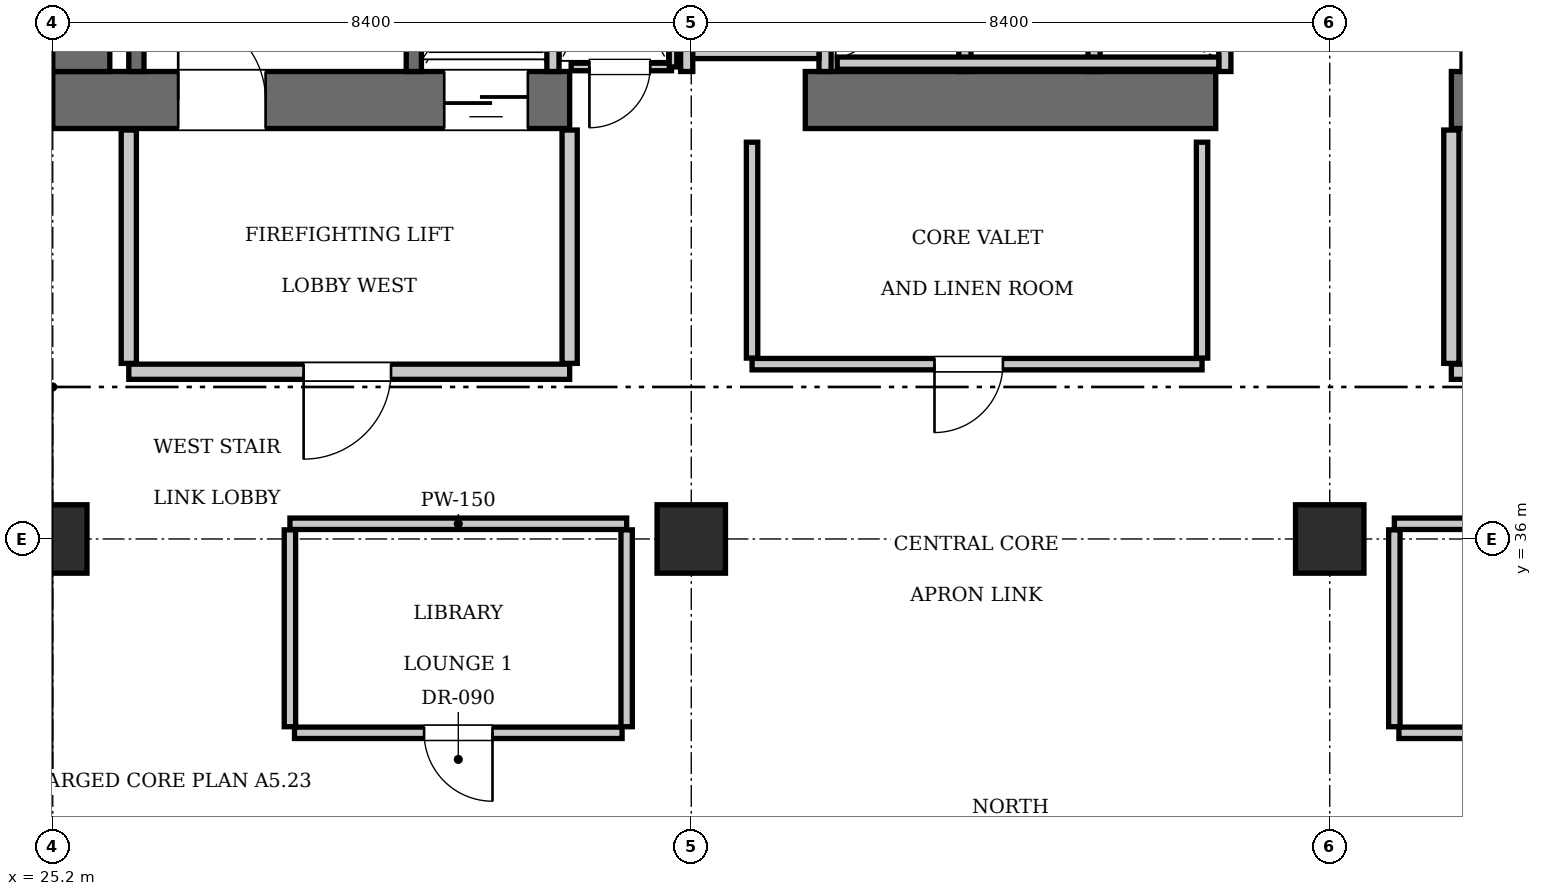
"""IFC4 building model, lengths in metres.
Left out: names, types, materials, properties, quantities, classifications, styles, units other than length and angle.
Written with IfcOpenShell. Run it as: python <this file> out.ifc"""

import sys

from ifc_helpers import new_model, si_unit, direction, frame, frame_2d, origin, origin_2d, place, context, subcontext, project, spatial, rectangle, extrude, element, fill, save


model = new_model("IFC4")
c1 = context("Model", 3, precision=1e-05, world=origin(), true_north=direction((0.0, 1.0)))
c2 = subcontext(c1, "Body", "Model", "MODEL_VIEW")
j1 = project(units=[si_unit("LENGTHUNIT", "METRE"), si_unit("PLANEANGLEUNIT", "RADIAN")], contexts=[c1])
p1 = place(None, origin())
s1 = spatial("IfcSite", under=j1, at=p1, CompositionType="ELEMENT")
p2 = place(p1, origin())
s2 = spatial("IfcBuilding", under=s1, at=p2, CompositionType="ELEMENT")
p3 = place(p2, frame((0.0, 0.0, 185.15)))
s3 = spatial("IfcBuildingStorey", under=s2, at=p3, CompositionType="ELEMENT", Elevation=185.15)
p4 = place(p3, frame((25.2, 41.775, 0.0), z_axis=(0.0, 0.0, 1.0), x_axis=(1.0, 0.0, 0.0)))
e1 = element("IfcWall", 1, at=p4, inside=s3, PredefinedType="SHEAR", context=c2, shape_type="SweptSolid", body=[
    extrude(rectangle(XDim=6.8, YDim=0.75, at=frame_2d((3.4, 0.0))), origin(), (0.0, 0.0, 1.0), 3.85),
])
p5 = place(p4, frame((1.65, 0.0, 0.0)))
e2 = element("IfcOpeningElement", 2, at=p5, cuts=e1, PredefinedType="OPENING", context=c2, shape_type="SweptSolid", body=[
    extrude(rectangle(XDim=1.15, YDim=2.15, at=frame_2d((0.575, 1.075))), frame((0.0, 0.385, 0.0), z_axis=(0.0, -1.0, 0.0), x_axis=(1.0, 0.0, 0.0)), (0.0, 0.0, 1.0), 0.77),
])
p6 = place(p4, frame((5.15, 0.0, 0.0)))
e3 = element("IfcOpeningElement", 3, at=p6, cuts=e1, PredefinedType="OPENING", context=c2, shape_type="SweptSolid", body=[
    extrude(rectangle(XDim=1.1, YDim=2.2, at=frame_2d((0.55, 1.1))), frame((0.0, 0.385, 0.0), z_axis=(0.0, -1.0, 0.0), x_axis=(1.0, 0.0, 0.0)), (0.0, 0.0, 1.0), 0.77),
])
p7 = place(p3, frame((35.1, 41.775, 0.0), z_axis=(0.0, 0.0, 1.0), x_axis=(1.0, 0.0, 0.0)))
e4 = element("IfcWall", 4, at=p7, inside=s3, PredefinedType="SHEAR", context=c2, shape_type="SweptSolid", body=[
    extrude(rectangle(XDim=5.4, YDim=0.75, at=frame_2d((2.7, 0.0))), origin(), (0.0, 0.0, 1.0), 3.85),
])
p8 = place(p3, frame((43.6, 41.775, 0.0), z_axis=(0.0, 0.0, 1.0), x_axis=(1.0, 0.0, 0.0)))
e5 = element("IfcWall", 5, at=p8, inside=s3, PredefinedType="SHEAR", context=c2, shape_type="SweptSolid", body=[
    extrude(rectangle(XDim=6.8, YDim=0.75, at=frame_2d((3.4, 0.0))), origin(), (0.0, 0.0, 1.0), 3.85),
])
p9 = place(p8, frame((3.9, 0.0, 0.0)))
e6 = element("IfcOpeningElement", 6, at=p9, cuts=e5, PredefinedType="OPENING", context=c2, shape_type="SweptSolid", body=[
    extrude(rectangle(XDim=1.15, YDim=2.15, at=frame_2d((0.575, 1.075))), frame((0.0, 0.385, 0.0), z_axis=(0.0, -1.0, 0.0), x_axis=(1.0, 0.0, 0.0)), (0.0, 0.0, 1.0), 0.77),
])
p10 = place(p8, frame((0.55, 0.0, 0.0)))
e7 = element("IfcOpeningElement", 7, at=p10, cuts=e5, PredefinedType="OPENING", context=c2, shape_type="SweptSolid", body=[
    extrude(rectangle(XDim=1.1, YDim=2.2, at=frame_2d((0.55, 1.1))), frame((0.0, 0.385, 0.0), z_axis=(0.0, -1.0, 0.0), x_axis=(1.0, 0.0, 0.0)), (0.0, 0.0, 1.0), 0.77),
])
p11 = place(p3, frame((25.575, 42.15, 0.0), z_axis=(0.0, 0.0, 1.0), x_axis=(0.0, 1.0, 0.0)))
e8 = element("IfcWall", 8, at=p11, inside=s3, PredefinedType="SHEAR", context=c2, shape_type="SweptSolid", body=[
    extrude(rectangle(XDim=1.9, YDim=0.75, at=frame_2d((0.95, 0.0))), origin(), (0.0, 0.0, 1.0), 3.85),
])
for number, where, z_axis, x_axis in (
    (9, (25.2, 36.0, 0.0), (0.0, 0.0, 1.0), (1.0, 0.0, 0.0)),
    (10, (33.6, 36.0, 0.0), (0.0, 0.0, 1.0), (1.0, 0.0, 0.0)),
    (11, (42.0, 36.0, 0.0), (0.0, 0.0, 1.0), (1.0, 0.0, 0.0)),
):
    element("IfcColumn", number, at=place(p3, frame(where, z_axis=z_axis, x_axis=x_axis)), inside=s3, PredefinedType="COLUMN", context=c2, shape_type="SweptSolid", body=[
        extrude(rectangle(XDim=0.9, YDim=0.9, at=origin_2d()), origin(), (0.0, 0.0, 1.0), 3.85),
    ])
p12 = place(p3, frame((29.95, 42.15, 0.0), z_axis=(0.0, 0.0, 1.0), x_axis=(0.0, 1.0, 0.0)))
e12 = element("IfcWall", 12, at=p12, inside=s3, PredefinedType="SOLIDWALL", context=c2, shape_type="SweptSolid", body=[
    extrude(rectangle(XDim=9.0, YDim=0.2, at=frame_2d((4.5, 0.0))), origin(), (0.0, 0.0, 1.0), 3.61),
])
p13 = place(p3, frame((26.3, 42.15, 0.0), z_axis=(0.0, 0.0, 1.0), x_axis=(0.0, 1.0, 0.0)))
e13 = element("IfcWall", 13, at=p13, inside=s3, PredefinedType="SOLIDWALL", context=c2, shape_type="SweptSolid", body=[
    extrude(rectangle(XDim=1.87, YDim=0.2, at=frame_2d((0.935, 0.0))), origin(), (0.0, 0.0, 1.0), 3.61),
])
for number, where, z_axis, x_axis in (
    (14, (31.78, 42.15, 0.0), (0.0, 0.0, 1.0), (0.0, 1.0, 0.0)),
    (15, (43.82, 42.15, 0.0), (0.0, 0.0, 1.0), (0.0, 1.0, 0.0)),
):
    element("IfcWall", number, at=place(p3, frame(where, z_axis=z_axis, x_axis=x_axis)), inside=s3, PredefinedType="SOLIDWALL", context=c2, shape_type="SweptSolid", body=[
        extrude(rectangle(XDim=2.59, YDim=0.16, at=frame_2d((1.295, 0.0))), origin(), (0.0, 0.0, 1.0), 3.61),
    ])
for number, where, z_axis, x_axis in (
    (16, (37.2, 42.15, 0.0), (0.0, 0.0, 1.0), (0.0, 1.0, 0.0)),
    (17, (38.9, 42.15, 0.0), (0.0, 0.0, 1.0), (0.0, 1.0, 0.0)),
    (18, (40.62, 42.15, 0.0), (0.0, 0.0, 1.0), (0.0, 1.0, 0.0)),
):
    element("IfcWall", number, at=place(p3, frame(where, z_axis=z_axis, x_axis=x_axis)), inside=s3, PredefinedType="SOLIDWALL", context=c2, shape_type="SweptSolid", body=[
        extrude(rectangle(XDim=2.2, YDim=0.16, at=frame_2d((1.1, 0.0))), origin(), (0.0, 0.0, 1.0), 3.61),
    ])
p14 = place(p3, frame((35.52, 42.26, 0.0), z_axis=(0.0, 0.0, 1.0), x_axis=(1.0, 0.0, 0.0)))
e19 = element("IfcWall", 19, at=p14, inside=s3, PredefinedType="SOLIDWALL", context=c2, shape_type="SweptSolid", body=[
    extrude(rectangle(XDim=5.02, YDim=0.16, at=frame_2d((2.51, 0.0))), origin(), (0.0, 0.0, 1.0), 3.61),
])
for number, where, z_axis, x_axis in (
    (20, (33.54, 42.15, 0.0), (0.0, 0.0, 1.0), (0.0, 1.0, 0.0)),
    (21, (35.36, 42.15, 0.0), (0.0, 0.0, 1.0), (0.0, 1.0, 0.0)),
):
    element("IfcWall", number, at=place(p3, frame(where, z_axis=z_axis, x_axis=x_axis)), inside=s3, PredefinedType="SOLIDWALL", context=c2, shape_type="SweptSolid", body=[
        extrude(rectangle(XDim=2.25, YDim=0.16, at=frame_2d((1.125, 0.0))), origin(), (0.0, 0.0, 1.0), 3.61),
    ])
p15 = place(p3, frame((33.62, 42.4, 0.0), z_axis=(0.0, 0.0, 1.0), x_axis=(1.0, 0.0, 0.0)))
e22 = element("IfcWall", 22, at=p15, inside=s3, PredefinedType="SOLIDWALL", context=c2, shape_type="SweptSolid", body=[
    extrude(rectangle(XDim=1.66, YDim=0.16, at=frame_2d((0.83, 0.0))), origin(), (0.0, 0.0, 1.0), 3.61),
])
p16 = place(p3, frame((26.2, 38.2, 0.0), z_axis=(0.0, 0.0, 1.0), x_axis=(1.0, 0.0, 0.0)))
e23 = element("IfcWall", 23, at=p16, inside=s3, PredefinedType="PARTITIONING", context=c2, shape_type="SweptSolid", body=[
    extrude(rectangle(XDim=5.8, YDim=0.2, at=frame_2d((2.9, 0.0))), origin(), (0.0, 0.0, 1.0), 3.61),
])
p17 = place(p16, frame((2.3, 0.0, 0.0)))
e24 = element("IfcOpeningElement", 24, at=p17, cuts=e23, PredefinedType="OPENING", context=c2, shape_type="SweptSolid", body=[
    extrude(rectangle(XDim=1.15, YDim=2.15, at=frame_2d((0.575, 1.075))), frame((0.0, 0.11, 0.0), z_axis=(0.0, -1.0, 0.0), x_axis=(1.0, 0.0, 0.0)), (0.0, 0.0, 1.0), 0.22),
])
for number, where, z_axis, x_axis in (
    (25, (26.2, 38.31, 0.0), (0.0, 0.0, 1.0), (0.0, 1.0, 0.0)),
    (26, (32.0, 38.31, 0.0), (0.0, 0.0, 1.0), (0.0, 1.0, 0.0)),
):
    element("IfcWall", number, at=place(p3, frame(where, z_axis=z_axis, x_axis=x_axis)), inside=s3, PredefinedType="PARTITIONING", context=c2, shape_type="SweptSolid", body=[
        extrude(rectangle(XDim=3.07, YDim=0.2, at=frame_2d((1.535, 0.0))), origin(), (0.0, 0.0, 1.0), 3.61),
    ])
p18 = place(p3, frame((43.6, 38.2, 0.0), z_axis=(0.0, 0.0, 1.0), x_axis=(1.0, 0.0, 0.0)))
e27 = element("IfcWall", 27, at=p18, inside=s3, PredefinedType="PARTITIONING", context=c2, shape_type="SweptSolid", body=[
    extrude(rectangle(XDim=5.8, YDim=0.2, at=frame_2d((2.9, 0.0))), origin(), (0.0, 0.0, 1.0), 3.61),
])
p19 = place(p18, frame((2.3, 0.0, 0.0)))
e28 = element("IfcOpeningElement", 28, at=p19, cuts=e27, PredefinedType="OPENING", context=c2, shape_type="SweptSolid", body=[
    extrude(rectangle(XDim=1.15, YDim=2.15, at=frame_2d((0.575, 1.075))), frame((0.0, 0.11, 0.0), z_axis=(0.0, -1.0, 0.0), x_axis=(1.0, 0.0, 0.0)), (0.0, 0.0, 1.0), 0.22),
])
p20 = place(p3, frame((43.6, 38.31, 0.0), z_axis=(0.0, 0.0, 1.0), x_axis=(0.0, 1.0, 0.0)))
e29 = element("IfcWall", 29, at=p20, inside=s3, PredefinedType="PARTITIONING", context=c2, shape_type="SweptSolid", body=[
    extrude(rectangle(XDim=3.07, YDim=0.2, at=frame_2d((1.535, 0.0))), origin(), (0.0, 0.0, 1.0), 3.61),
])
p21 = place(p3, frame((32.02, 42.21, 0.0), z_axis=(0.0, 0.0, 1.0), x_axis=(1.0, 0.0, 0.0)))
e30 = element("IfcWall", 30, at=p21, inside=s3, PredefinedType="PARTITIONING", context=c2, shape_type="SweptSolid", body=[
    extrude(rectangle(XDim=1.32, YDim=0.1, at=frame_2d((0.66, 0.0))), origin(), (0.0, 0.0, 1.0), 3.61),
])
p22 = place(p21, frame((0.24, 0.0, 0.0)))
e31 = element("IfcOpeningElement", 31, at=p22, cuts=e30, PredefinedType="OPENING", context=c2, shape_type="SweptSolid", body=[
    extrude(rectangle(XDim=0.8, YDim=2.05, at=frame_2d((0.4, 1.025))), frame((0.0, 0.06, 0.0), z_axis=(0.0, -1.0, 0.0), x_axis=(1.0, 0.0, 0.0)), (0.0, 0.0, 1.0), 0.12),
])
p23 = place(p3, frame((33.36, 42.21, 0.0), z_axis=(0.0, 0.0, 1.0), x_axis=(0.0, 1.0, 0.0)))
e32 = element("IfcWall", 32, at=p23, inside=s3, PredefinedType="PARTITIONING", context=c2, shape_type="SweptSolid", body=[
    extrude(rectangle(XDim=2.73, YDim=0.1, at=frame_2d((1.365, 0.0))), origin(), (0.0, 0.0, 1.0), 3.61),
])
p24 = place(p3, frame((34.4, 38.3, 0.0), z_axis=(0.0, 0.0, 1.0), x_axis=(1.0, 0.0, 0.0)))
e33 = element("IfcWall", 33, at=p24, inside=s3, PredefinedType="PARTITIONING", context=c2, shape_type="SweptSolid", body=[
    extrude(rectangle(XDim=5.92, YDim=0.15, at=frame_2d((2.96, 0.0))), origin(), (0.0, 0.0, 1.0), 3.61),
])
p25 = place(p24, frame((2.4, 0.0, 0.0)))
e34 = element("IfcOpeningElement", 34, at=p25, cuts=e33, PredefinedType="OPENING", context=c2, shape_type="SweptSolid", body=[
    extrude(rectangle(XDim=0.9, YDim=2.1, at=frame_2d((0.45, 1.05))), frame((0.0, 0.085, 0.0), z_axis=(0.0, -1.0, 0.0), x_axis=(1.0, 0.0, 0.0)), (0.0, 0.0, 1.0), 0.17),
])
for number, where, z_axis, x_axis in (
    (35, (34.4, 38.38, 0.0), (0.0, 0.0, 1.0), (0.0, 1.0, 0.0)),
    (36, (40.32, 38.38, 0.0), (0.0, 0.0, 1.0), (0.0, 1.0, 0.0)),
):
    element("IfcWall", number, at=place(p3, frame(where, z_axis=z_axis, x_axis=x_axis)), inside=s3, PredefinedType="PARTITIONING", context=c2, shape_type="SweptSolid", body=[
        extrude(rectangle(XDim=2.84, YDim=0.15, at=frame_2d((1.42, 0.0))), origin(), (0.0, 0.0, 1.0), 3.61),
    ])
p26 = place(p3, frame((28.32, 36.2, 0.0), z_axis=(0.0, 0.0, 1.0), x_axis=(1.0, 0.0, 0.0)))
e37 = element("IfcWall", 37, at=p26, inside=s3, PredefinedType="PARTITIONING", context=c2, shape_type="SweptSolid", body=[
    extrude(rectangle(XDim=4.43, YDim=0.15, at=frame_2d((2.215, 0.0))), origin(), (0.0, 0.0, 1.0), 3.61),
])
for number, where, z_axis, x_axis in (
    (38, (28.32, 33.53, 0.0), (0.0, 0.0, 1.0), (0.0, 1.0, 0.0)),
    (39, (32.75, 33.53, 0.0), (0.0, 0.0, 1.0), (0.0, 1.0, 0.0)),
):
    element("IfcWall", number, at=place(p3, frame(where, z_axis=z_axis, x_axis=x_axis)), inside=s3, PredefinedType="PARTITIONING", context=c2, shape_type="SweptSolid", body=[
        extrude(rectangle(XDim=2.59, YDim=0.15, at=frame_2d((1.295, 0.0))), origin(), (0.0, 0.0, 1.0), 3.61),
    ])
p27 = place(p3, frame((28.38, 33.45, 0.0), z_axis=(0.0, 0.0, 1.0), x_axis=(1.0, 0.0, 0.0)))
e40 = element("IfcWall", 40, at=p27, inside=s3, PredefinedType="PARTITIONING", context=c2, shape_type="SweptSolid", body=[
    extrude(rectangle(XDim=4.31, YDim=0.15, at=frame_2d((2.155, 0.0))), origin(), (0.0, 0.0, 1.0), 3.61),
])
p28 = place(p27, frame((1.705, 0.0, 0.0)))
e41 = element("IfcOpeningElement", 41, at=p28, cuts=e40, PredefinedType="OPENING", context=c2, shape_type="SweptSolid", body=[
    extrude(rectangle(XDim=0.9, YDim=2.1, at=frame_2d((0.45, 1.05))), frame((0.0, 0.085, 0.0), z_axis=(0.0, -1.0, 0.0), x_axis=(1.0, 0.0, 0.0)), (0.0, 0.0, 1.0), 0.17),
])
p29 = place(p3, frame((42.85, 36.2, 0.0), z_axis=(0.0, 0.0, 1.0), x_axis=(1.0, 0.0, 0.0)))
e42 = element("IfcWall", 42, at=p29, inside=s3, PredefinedType="PARTITIONING", context=c2, shape_type="SweptSolid", body=[
    extrude(rectangle(XDim=4.43, YDim=0.15, at=frame_2d((2.215, 0.0))), origin(), (0.0, 0.0, 1.0), 3.61),
])
p30 = place(p3, frame((42.85, 33.53, 0.0), z_axis=(0.0, 0.0, 1.0), x_axis=(0.0, 1.0, 0.0)))
e43 = element("IfcWall", 43, at=p30, inside=s3, PredefinedType="PARTITIONING", context=c2, shape_type="SweptSolid", body=[
    extrude(rectangle(XDim=2.59, YDim=0.15, at=frame_2d((1.295, 0.0))), origin(), (0.0, 0.0, 1.0), 3.61),
])
p31 = place(p3, frame((42.91, 33.45, 0.0), z_axis=(0.0, 0.0, 1.0), x_axis=(1.0, 0.0, 0.0)))
e44 = element("IfcWall", 44, at=p31, inside=s3, PredefinedType="PARTITIONING", context=c2, shape_type="SweptSolid", body=[
    extrude(rectangle(XDim=4.31, YDim=0.15, at=frame_2d((2.155, 0.0))), origin(), (0.0, 0.0, 1.0), 3.61),
])
p32 = place(p31, frame((1.705, 0.0, 0.0)))
e45 = element("IfcOpeningElement", 45, at=p32, cuts=e44, PredefinedType="OPENING", context=c2, shape_type="SweptSolid", body=[
    extrude(rectangle(XDim=0.9, YDim=2.1, at=frame_2d((0.45, 1.05))), frame((0.0, 0.085, 0.0), z_axis=(0.0, -1.0, 0.0), x_axis=(1.0, 0.0, 0.0)), (0.0, 0.0, 1.0), 0.17),
])
p33 = place(p5, origin())
e46 = element("IfcDoor", 46, at=p33, inside=s3, OperationType="SINGLE_SWING_LEFT", PredefinedType="DOOR", context=c2, shape_type="SweptSolid", body=[
    extrude(rectangle(XDim=1.15, YDim=2.15, at=frame_2d((0.575, 1.075))), frame((0.0, 0.025, 0.0), z_axis=(0.0, -1.0, 0.0), x_axis=(1.0, 0.0, 0.0)), (0.0, 0.0, 1.0), 0.05),
])
fill(e2, e46)
p34 = place(p6, frame((1.1, 0.0, 0.0), z_axis=(0.0, 0.0, 1.0), x_axis=(-1.0, 0.0, 0.0)))
e47 = element("IfcDoor", 47, at=p34, inside=s3, OperationType="SLIDING_TO_LEFT", PredefinedType="DOOR", context=c2, shape_type="SweptSolid", body=[
    extrude(rectangle(XDim=1.1, YDim=2.2, at=frame_2d((0.55, 1.1))), frame((0.0, 0.025, 0.0), z_axis=(0.0, -1.0, 0.0), x_axis=(1.0, 0.0, 0.0)), (0.0, 0.0, 1.0), 0.05),
])
fill(e3, e47)
p35 = place(p17, frame((1.15, 0.0, 0.0), z_axis=(0.0, 0.0, 1.0), x_axis=(-1.0, 0.0, 0.0)))
e48 = element("IfcDoor", 48, at=p35, inside=s3, OperationType="SINGLE_SWING_RIGHT", PredefinedType="DOOR", context=c2, shape_type="SweptSolid", body=[
    extrude(rectangle(XDim=1.15, YDim=2.15, at=frame_2d((0.575, 1.075))), frame((0.0, 0.025, 0.0), z_axis=(0.0, -1.0, 0.0), x_axis=(1.0, 0.0, 0.0)), (0.0, 0.0, 1.0), 0.05),
])
fill(e24, e48)
p36 = place(p22, frame((0.8, 0.0, 0.0), z_axis=(0.0, 0.0, 1.0), x_axis=(-1.0, 0.0, 0.0)))
e49 = element("IfcDoor", 49, at=p36, inside=s3, OperationType="SINGLE_SWING_RIGHT", PredefinedType="DOOR", context=c2, shape_type="SweptSolid", body=[
    extrude(rectangle(XDim=0.8, YDim=2.05, at=frame_2d((0.4, 1.025))), frame((0.0, 0.025, 0.0), z_axis=(0.0, -1.0, 0.0), x_axis=(1.0, 0.0, 0.0)), (0.0, 0.0, 1.0), 0.05),
])
fill(e31, e49)
p37 = place(p25, frame((0.9, 0.0, 0.0), z_axis=(0.0, 0.0, 1.0), x_axis=(-1.0, 0.0, 0.0)))
e50 = element("IfcDoor", 50, at=p37, inside=s3, OperationType="SINGLE_SWING_RIGHT", PredefinedType="DOOR", context=c2, shape_type="SweptSolid", body=[
    extrude(rectangle(XDim=0.9, YDim=2.1, at=frame_2d((0.45, 1.05))), frame((0.0, 0.025, 0.0), z_axis=(0.0, -1.0, 0.0), x_axis=(1.0, 0.0, 0.0)), (0.0, 0.0, 1.0), 0.05),
])
fill(e34, e50)
p38 = place(p28, frame((0.9, 0.0, 0.0), z_axis=(0.0, 0.0, 1.0), x_axis=(-1.0, 0.0, 0.0)))
e51 = element("IfcDoor", 51, at=p38, inside=s3, OperationType="SINGLE_SWING_LEFT", PredefinedType="DOOR", context=c2, shape_type="SweptSolid", body=[
    extrude(rectangle(XDim=0.9, YDim=2.1, at=frame_2d((0.45, 1.05))), frame((0.0, 0.025, 0.0), z_axis=(0.0, -1.0, 0.0), x_axis=(1.0, 0.0, 0.0)), (0.0, 0.0, 1.0), 0.05),
])
fill(e41, e51)
save(model, sys.argv[1])
